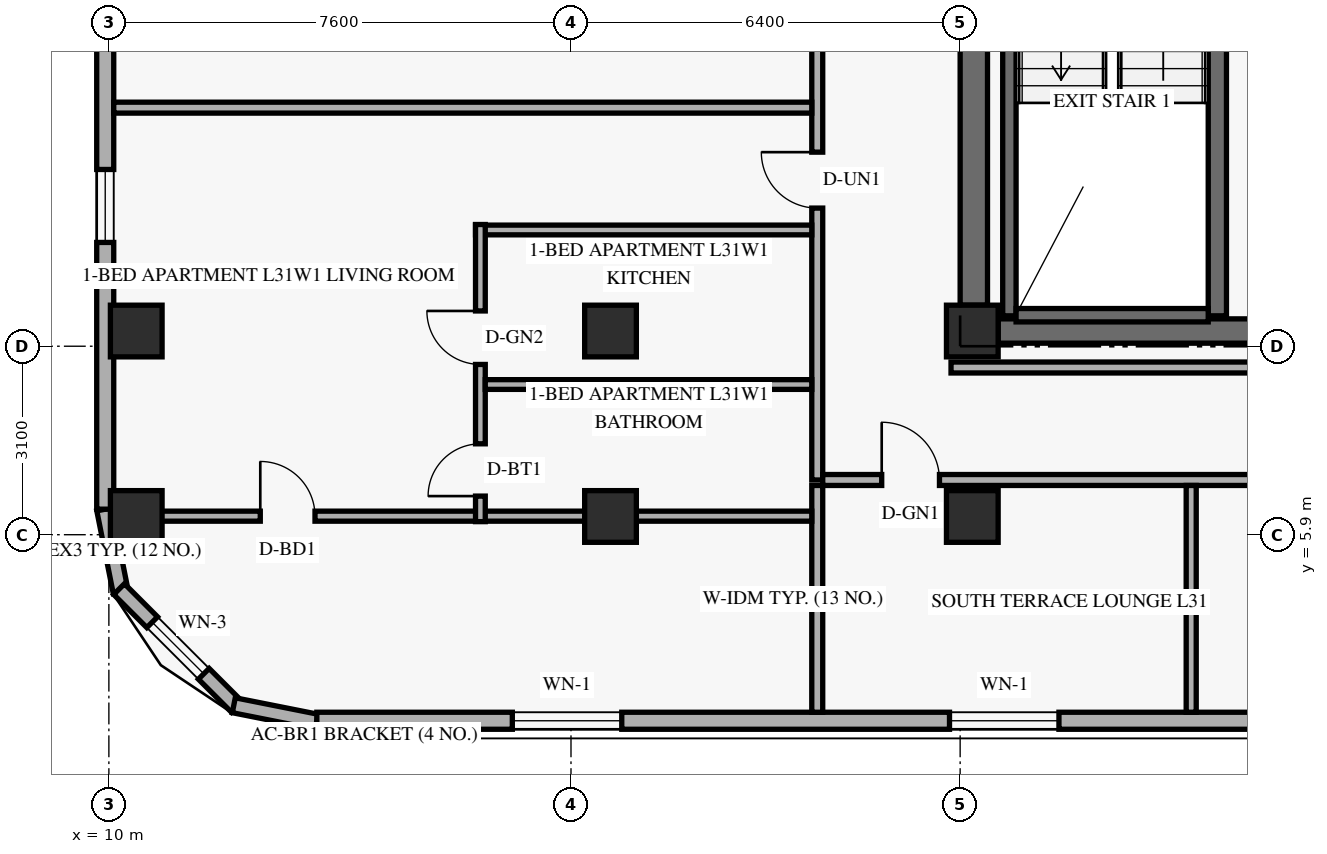
"""IFC4 building model, lengths in metres.
Left out: names, types, materials, properties, quantities, classifications, styles, units other than length and angle.
Written with IfcOpenShell. Run it as: python <this file> out.ifc"""

import sys

from ifc_helpers import new_model, si_unit, direction, frame, frame_2d, origin, origin_2d, place, context, subcontext, project, spatial, rectangle, extrude, element, fill, save


model = new_model("IFC4")
c1 = context("Model", 3, precision=1e-05, world=origin(), true_north=direction((0.0, 1.0)))
c2 = subcontext(c1, "Body", "Model", "MODEL_VIEW")
j1 = project(units=[si_unit("LENGTHUNIT", "METRE"), si_unit("PLANEANGLEUNIT", "RADIAN")], contexts=[c1])
p1 = place(None, origin())
s1 = spatial("IfcSite", under=j1, at=p1, CompositionType="ELEMENT")
p2 = place(p1, origin())
s2 = spatial("IfcBuilding", under=s1, at=p2, CompositionType="ELEMENT")
p3 = place(p2, frame((0.0, 0.0, 121.2)))
s3 = spatial("IfcBuildingStorey", under=s2, at=p3, CompositionType="ELEMENT", Elevation=121.2)
p4 = place(p3, frame((24.225, 9.675, 0.0), z_axis=(0.0, 0.0, 1.0), x_axis=(0.0, 1.0, 0.0)))
e1 = element("IfcWall", 1, at=p4, inside=s3, PredefinedType="SHEAR", context=c2, shape_type="SweptSolid", body=[
    extrude(rectangle(XDim=7.45, YDim=0.45, at=frame_2d((3.725, 0.0))), origin(), (0.0, 0.0, 1.0), 2.749),
])
p5 = place(p3, frame((24.625, 9.25, 0.0), z_axis=(0.0, 0.0, 1.0), x_axis=(1.0, 0.0, 0.0)))
e2 = element("IfcWall", 2, at=p5, inside=s3, PredefinedType="SHEAR", context=c2, shape_type="SweptSolid", body=[
    extrude(rectangle(XDim=10.15, YDim=0.4, at=frame_2d((5.075, 0.0))), origin(), (0.0, 0.0, 1.0), 3.36),
])
p6 = place(p5, frame((5.2, 0.0, 0.0)))
e3 = element("IfcOpeningElement", 3, at=p6, cuts=e2, PredefinedType="OPENING", context=c2, shape_type="SweptSolid", body=[
    extrude(rectangle(XDim=1.05, YDim=2.15, at=frame_2d((0.525, 1.075))), frame((0.0, 0.21, 0.0), z_axis=(0.0, -1.0, 0.0), x_axis=(1.0, 0.0, 0.0)), (0.0, 0.0, 1.0), 0.42),
])
p7 = place(p3, frame((24.81, 9.5, 0.0), z_axis=(0.0, 0.0, 1.0), x_axis=(0.0, 1.0, 0.0)))
e4 = element("IfcWall", 4, at=p7, inside=s3, PredefinedType="SHEAR", context=c2, shape_type="SweptSolid", body=[
    extrude(rectangle(XDim=7.76, YDim=0.22, at=frame_2d((3.88, 0.0))), origin(), (0.0, 0.0, 1.0), 3.36),
])
p8 = place(p3, frame((28.23, 9.5, 0.0), z_axis=(0.0, 0.0, 1.0), x_axis=(0.0, 1.0, 0.0)))
e5 = element("IfcWall", 5, at=p8, inside=s3, PredefinedType="SHEAR", context=c2, shape_type="SweptSolid", body=[
    extrude(rectangle(XDim=7.76, YDim=0.3, at=frame_2d((3.88, 0.0))), origin(), (0.0, 0.0, 1.0), 3.36),
])
p9 = place(p3, frame((24.92, 9.51, 0.0), z_axis=(0.0, 0.0, 1.0), x_axis=(1.0, 0.0, 0.0)))
e6 = element("IfcWall", 6, at=p9, inside=s3, PredefinedType="SHEAR", context=c2, shape_type="SweptSolid", body=[
    extrude(rectangle(XDim=3.16, YDim=0.22, at=frame_2d((1.58, 0.0))), origin(), (0.0, 0.0, 1.0), 3.36),
])
for number, where, z_axis, x_axis in (
    (7, (10.45, 6.2, 0.0), (0.0, 0.0, 1.0), (1.0, 0.0, 0.0)),
    (8, (10.45, 9.25, 0.0), (0.0, 0.0, 1.0), (1.0, 0.0, 0.0)),
    (9, (18.25, 6.2, 0.0), (0.0, 0.0, 1.0), (1.0, 0.0, 0.0)),
    (10, (18.25, 9.25, 0.0), (0.0, 0.0, 1.0), (1.0, 0.0, 0.0)),
    (11, (24.2, 6.2, 0.0), (0.0, 0.0, 1.0), (1.0, 0.0, 0.0)),
    (12, (24.2, 9.25, 0.0), (0.0, 0.0, 1.0), (1.0, 0.0, 0.0)),
):
    element("IfcColumn", number, at=place(p3, frame(where, z_axis=z_axis, x_axis=x_axis)), inside=s3, PredefinedType="COLUMN", context=c2, shape_type="SweptSolid", body=[
        extrude(rectangle(XDim=0.85, YDim=0.85, at=origin_2d()), origin(), (0.0, 0.0, 1.0), 3.6),
    ])
p10 = place(p3, frame((9.924, 6.316, 0.0), z_axis=(0.0, 0.0, 1.0), x_axis=(0.195000137217, -0.980803214965, 0.0)))
e13 = element("IfcWall", 13, at=p10, inside=s3, PredefinedType="SOLIDWALL", context=c2, shape_type="SweptSolid", body=[
    extrude(rectangle(XDim=1.388, YDim=0.25, at=frame_2d((0.694, 0.0))), origin(), (0.0, 0.0, 1.0), 3.36),
])
p11 = place(p3, frame((10.168, 5.005, 0.0), z_axis=(0.0, 0.0, 1.0), x_axis=(0.707151344399, -0.707062215165, 0.0)))
e14 = element("IfcWall", 14, at=p11, inside=s3, PredefinedType="SOLIDWALL", context=c2, shape_type="SweptSolid", body=[
    extrude(rectangle(XDim=2.739, YDim=0.25, at=frame_2d((1.37, 0.0))), origin(), (0.0, 0.0, 1.0), 3.36),
])
p12 = place(p11, frame((0.77, 0.0, 0.85)))
e15 = element("IfcOpeningElement", 15, at=p12, cuts=e14, PredefinedType="OPENING", context=c2, shape_type="SweptSolid", body=[
    extrude(rectangle(XDim=1.2, YDim=1.5, at=frame_2d((0.6, 0.75))), frame((0.0, 0.135, 0.0), z_axis=(0.0, -1.0, 0.0), x_axis=(1.0, 0.0, 0.0)), (0.0, 0.0, 1.0), 0.27),
])
p13 = place(p3, frame((12.054, 3.095, 0.0), z_axis=(0.0, 0.0, 1.0), x_axis=(0.980809899341, -0.19496651342, 0.0)))
e16 = element("IfcWall", 16, at=p13, inside=s3, PredefinedType="SOLIDWALL", context=c2, shape_type="SweptSolid", body=[
    extrude(rectangle(XDim=1.389, YDim=0.25, at=frame_2d((0.694, 0.0))), origin(), (0.0, 0.0, 1.0), 3.36),
])
p14 = place(p3, frame((13.42, 2.84, 0.0), z_axis=(0.0, 0.0, 1.0), x_axis=(1.0, 0.0, 0.0)))
e17 = element("IfcWall", 17, at=p14, inside=s3, PredefinedType="SOLIDWALL", context=c2, shape_type="SweptSolid", body=[
    extrude(rectangle(XDim=36.56, YDim=0.28, at=frame_2d((18.28, 0.0))), origin(), (0.0, 0.0, 1.0), 3.36),
])
p15 = place(p14, frame((3.215, 0.0, 0.85)))
e18 = element("IfcOpeningElement", 18, at=p15, cuts=e17, PredefinedType="OPENING", context=c2, shape_type="SweptSolid", body=[
    extrude(rectangle(XDim=1.8, YDim=1.6, at=frame_2d((0.9, 0.8))), frame((0.0, 0.15, 0.0), z_axis=(0.0, -1.0, 0.0), x_axis=(1.0, 0.0, 0.0)), (0.0, 0.0, 1.0), 0.3),
])
p16 = place(p14, frame((10.405, 0.0, 0.85)))
e19 = element("IfcOpeningElement", 19, at=p16, cuts=e17, PredefinedType="OPENING", context=c2, shape_type="SweptSolid", body=[
    extrude(rectangle(XDim=1.8, YDim=1.6, at=frame_2d((0.9, 0.8))), frame((0.0, 0.15, 0.0), z_axis=(0.0, -1.0, 0.0), x_axis=(1.0, 0.0, 0.0)), (0.0, 0.0, 1.0), 0.3),
])
p17 = place(p14, frame((17.29, 0.0, 0.85)))
e20 = element("IfcOpeningElement", 20, at=p17, cuts=e17, PredefinedType="OPENING", context=c2, shape_type="SweptSolid", body=[
    extrude(rectangle(XDim=1.8, YDim=1.6, at=frame_2d((0.9, 0.8))), frame((0.0, 0.15, 0.0), z_axis=(0.0, -1.0, 0.0), x_axis=(1.0, 0.0, 0.0)), (0.0, 0.0, 1.0), 0.3),
])
p18 = place(p14, frame((22.565, 0.0, 0.85)))
e21 = element("IfcOpeningElement", 21, at=p18, cuts=e17, PredefinedType="OPENING", context=c2, shape_type="SweptSolid", body=[
    extrude(rectangle(XDim=1.8, YDim=1.6, at=frame_2d((0.9, 0.8))), frame((0.0, 0.15, 0.0), z_axis=(0.0, -1.0, 0.0), x_axis=(1.0, 0.0, 0.0)), (0.0, 0.0, 1.0), 0.3),
])
p19 = place(p14, frame((28.355, 0.0, 0.85)))
e22 = element("IfcOpeningElement", 22, at=p19, cuts=e17, PredefinedType="OPENING", context=c2, shape_type="SweptSolid", body=[
    extrude(rectangle(XDim=1.8, YDim=1.6, at=frame_2d((0.9, 0.8))), frame((0.0, 0.15, 0.0), z_axis=(0.0, -1.0, 0.0), x_axis=(1.0, 0.0, 0.0)), (0.0, 0.0, 1.0), 0.3),
])
p20 = place(p14, frame((34.17, 0.0, 0.85)))
e23 = element("IfcOpeningElement", 23, at=p20, cuts=e17, PredefinedType="OPENING", context=c2, shape_type="SweptSolid", body=[
    extrude(rectangle(XDim=1.8, YDim=1.6, at=frame_2d((0.9, 0.8))), frame((0.0, 0.15, 0.0), z_axis=(0.0, -1.0, 0.0), x_axis=(1.0, 0.0, 0.0)), (0.0, 0.0, 1.0), 0.3),
])
p21 = place(p3, frame((9.94, 41.68, 0.0), z_axis=(0.0, 0.0, 1.0), x_axis=(0.0, -1.0, 0.0)))
e24 = element("IfcWall", 24, at=p21, inside=s3, PredefinedType="SOLIDWALL", context=c2, shape_type="SweptSolid", body=[
    extrude(rectangle(XDim=35.36, YDim=0.28, at=frame_2d((17.68, 0.0))), origin(), (0.0, 0.0, 1.0), 3.36),
])
p22 = place(p21, frame((29.773, 0.0, 0.85)))
e25 = element("IfcOpeningElement", 25, at=p22, cuts=e24, PredefinedType="OPENING", context=c2, shape_type="SweptSolid", body=[
    extrude(rectangle(XDim=1.2, YDim=1.5, at=frame_2d((0.6, 0.75))), frame((0.0, 0.15, 0.0), z_axis=(0.0, -1.0, 0.0), x_axis=(1.0, 0.0, 0.0)), (0.0, 0.0, 1.0), 0.3),
])
p23 = place(p21, frame((26.063, 0.0, 0.85)))
e26 = element("IfcOpeningElement", 26, at=p23, cuts=e24, PredefinedType="OPENING", context=c2, shape_type="SweptSolid", body=[
    extrude(rectangle(XDim=1.2, YDim=1.5, at=frame_2d((0.6, 0.75))), frame((0.0, 0.15, 0.0), z_axis=(0.0, -1.0, 0.0), x_axis=(1.0, 0.0, 0.0)), (0.0, 0.0, 1.0), 0.3),
])
p24 = place(p21, frame((19.032, 0.0, 0.85)))
e27 = element("IfcOpeningElement", 27, at=p24, cuts=e24, PredefinedType="OPENING", context=c2, shape_type="SweptSolid", body=[
    extrude(rectangle(XDim=1.2, YDim=1.5, at=frame_2d((0.6, 0.75))), frame((0.0, 0.15, 0.0), z_axis=(0.0, -1.0, 0.0), x_axis=(1.0, 0.0, 0.0)), (0.0, 0.0, 1.0), 0.3),
])
p25 = place(p21, frame((14.2, 0.0, 0.85)))
e28 = element("IfcOpeningElement", 28, at=p25, cuts=e24, PredefinedType="OPENING", context=c2, shape_type="SweptSolid", body=[
    extrude(rectangle(XDim=1.2, YDim=1.5, at=frame_2d((0.6, 0.75))), frame((0.0, 0.15, 0.0), z_axis=(0.0, -1.0, 0.0), x_axis=(1.0, 0.0, 0.0)), (0.0, 0.0, 1.0), 0.3),
])
p26 = place(p21, frame((7.956, 0.0, 0.85)))
e29 = element("IfcOpeningElement", 29, at=p26, cuts=e24, PredefinedType="OPENING", context=c2, shape_type="SweptSolid", body=[
    extrude(rectangle(XDim=1.2, YDim=1.5, at=frame_2d((0.6, 0.75))), frame((0.0, 0.15, 0.0), z_axis=(0.0, -1.0, 0.0), x_axis=(1.0, 0.0, 0.0)), (0.0, 0.0, 1.0), 0.3),
])
p27 = place(p21, frame((4.387, 0.0, 0.85)))
e30 = element("IfcOpeningElement", 30, at=p27, cuts=e24, PredefinedType="OPENING", context=c2, shape_type="SweptSolid", body=[
    extrude(rectangle(XDim=1.2, YDim=1.5, at=frame_2d((0.6, 0.75))), frame((0.0, 0.15, 0.0), z_axis=(0.0, -1.0, 0.0), x_axis=(1.0, 0.0, 0.0)), (0.0, 0.0, 1.0), 0.3),
])
p28 = place(p3, frame((21.65, 6.8, 0.0), z_axis=(0.0, 0.0, 1.0), x_axis=(0.0, 1.0, 0.0)))
e31 = element("IfcWall", 31, at=p28, inside=s3, PredefinedType="STANDARD", context=c2, shape_type="SweptSolid", body=[
    extrude(rectangle(XDim=34.4, YDim=0.18, at=frame_2d((17.2, 0.0))), origin(), (0.0, 0.0, 1.0), 2.731),
])
p29 = place(p28, frame((4.472, 0.0, 0.0)))
e32 = element("IfcOpeningElement", 32, at=p29, cuts=e31, PredefinedType="OPENING", context=c2, shape_type="SweptSolid", body=[
    extrude(rectangle(XDim=0.92, YDim=2.15, at=frame_2d((0.46, 1.075))), frame((0.0, 0.1, 0.0), z_axis=(0.0, -1.0, 0.0), x_axis=(1.0, 0.0, 0.0)), (0.0, 0.0, 1.0), 0.2),
])
p30 = place(p28, frame((7.261, 0.0, 0.0)))
e33 = element("IfcOpeningElement", 33, at=p30, cuts=e31, PredefinedType="OPENING", context=c2, shape_type="SweptSolid", body=[
    extrude(rectangle(XDim=0.92, YDim=2.15, at=frame_2d((0.46, 1.075))), frame((0.0, 0.1, 0.0), z_axis=(0.0, -1.0, 0.0), x_axis=(1.0, 0.0, 0.0)), (0.0, 0.0, 1.0), 0.2),
])
p31 = place(p28, frame((18.308, 0.0, 0.0)))
e34 = element("IfcOpeningElement", 34, at=p31, cuts=e31, PredefinedType="OPENING", context=c2, shape_type="SweptSolid", body=[
    extrude(rectangle(XDim=0.92, YDim=2.15, at=frame_2d((0.46, 1.075))), frame((0.0, 0.1, 0.0), z_axis=(0.0, -1.0, 0.0), x_axis=(1.0, 0.0, 0.0)), (0.0, 0.0, 1.0), 0.2),
])
p32 = place(p28, frame((29.045, 0.0, 0.0)))
e35 = element("IfcOpeningElement", 35, at=p32, cuts=e31, PredefinedType="OPENING", context=c2, shape_type="SweptSolid", body=[
    extrude(rectangle(XDim=0.92, YDim=2.15, at=frame_2d((0.46, 1.075))), frame((0.0, 0.1, 0.0), z_axis=(0.0, -1.0, 0.0), x_axis=(1.0, 0.0, 0.0)), (0.0, 0.0, 1.0), 0.2),
])
p33 = place(p3, frame((21.74, 6.8, 0.0), z_axis=(0.0, 0.0, 1.0), x_axis=(1.0, 0.0, 0.0)))
e36 = element("IfcWall", 36, at=p33, inside=s3, PredefinedType="STANDARD", context=c2, shape_type="SweptSolid", body=[
    extrude(rectangle(XDim=13.68, YDim=0.18, at=frame_2d((6.84, 0.0))), origin(), (0.0, 0.0, 1.0), 2.731),
])
p34 = place(p33, frame((0.97, 0.0, 0.0)))
e37 = element("IfcOpeningElement", 37, at=p34, cuts=e36, PredefinedType="OPENING", context=c2, shape_type="SweptSolid", body=[
    extrude(rectangle(XDim=0.95, YDim=2.15, at=frame_2d((0.475, 1.075))), frame((0.0, 0.1, 0.0), z_axis=(0.0, -1.0, 0.0), x_axis=(1.0, 0.0, 0.0)), (0.0, 0.0, 1.0), 0.2),
])
p35 = place(p33, frame((9.11, 0.0, 0.0)))
e38 = element("IfcOpeningElement", 38, at=p35, cuts=e36, PredefinedType="OPENING", context=c2, shape_type="SweptSolid", body=[
    extrude(rectangle(XDim=0.95, YDim=2.15, at=frame_2d((0.475, 1.075))), frame((0.0, 0.1, 0.0), z_axis=(0.0, -1.0, 0.0), x_axis=(1.0, 0.0, 0.0)), (0.0, 0.0, 1.0), 0.2),
])
p36 = place(p3, frame((23.85, 8.65, 0.0), z_axis=(0.0, 0.0, 1.0), x_axis=(1.0, 0.0, 0.0)))
e39 = element("IfcWall", 39, at=p36, inside=s3, PredefinedType="STANDARD", context=c2, shape_type="SweptSolid", body=[
    extrude(rectangle(XDim=11.57, YDim=0.18, at=frame_2d((5.785, 0.0))), origin(), (0.0, 0.0, 1.0), 2.731),
])
p37 = place(p3, frame((21.65, 2.98, 0.0), z_axis=(0.0, 0.0, 1.0), x_axis=(0.0, 1.0, 0.0)))
e40 = element("IfcWall", 40, at=p37, inside=s3, PredefinedType="PARTITIONING", context=c2, shape_type="SweptSolid", body=[
    extrude(rectangle(XDim=3.73, YDim=0.18, at=frame_2d((1.865, 0.0))), origin(), (0.0, 0.0, 1.0), 2.809),
])
p38 = place(p3, frame((10.099, 6.205, 0.0), z_axis=(0.0, 0.0, 1.0), x_axis=(1.0, 0.0, 0.0)))
e41 = element("IfcWall", 41, at=p38, inside=s3, PredefinedType="PARTITIONING", context=c2, shape_type="SweptSolid", body=[
    extrude(rectangle(XDim=11.461, YDim=0.165, at=frame_2d((5.73, 0.0))), origin(), (0.0, 0.0, 1.0), 2.809),
])
p39 = place(p38, frame((2.391, 0.0, 0.0)))
e42 = element("IfcOpeningElement", 42, at=p39, cuts=e41, PredefinedType="OPENING", context=c2, shape_type="SweptSolid", body=[
    extrude(rectangle(XDim=0.9, YDim=2.14, at=frame_2d((0.45, 1.07))), frame((0.0, 0.093, 0.0), z_axis=(0.0, -1.0, 0.0), x_axis=(1.0, 0.0, 0.0)), (0.0, 0.0, 1.0), 0.185),
])
p40 = place(p3, frame((16.03, 10.912, 0.0), z_axis=(0.0, 0.0, 1.0), x_axis=(1.0, 0.0, 0.0)))
e43 = element("IfcWall", 43, at=p40, inside=s3, PredefinedType="PLUMBINGWALL", context=c2, shape_type="SweptSolid", body=[
    extrude(rectangle(XDim=5.53, YDim=0.16, at=frame_2d((2.765, 0.0))), origin(), (0.0, 0.0, 1.0), 2.731),
])
p41 = place(p3, frame((16.11, 6.115, 0.0), z_axis=(0.0, 0.0, 1.0), x_axis=(0.0, 1.0, 0.0)))
e44 = element("IfcWall", 44, at=p41, inside=s3, PredefinedType="PLUMBINGWALL", context=c2, shape_type="SweptSolid", body=[
    extrude(rectangle(XDim=4.887, YDim=0.16, at=frame_2d((2.443, 0.0))), origin(), (0.0, 0.0, 1.0), 2.731),
])
p42 = place(p41, frame((0.42, 0.0, 0.0)))
e45 = element("IfcOpeningElement", 45, at=p42, cuts=e44, PredefinedType="OPENING", context=c2, shape_type="SweptSolid", body=[
    extrude(rectangle(XDim=0.86, YDim=2.12, at=frame_2d((0.43, 1.06))), frame((0.0, 0.09, 0.0), z_axis=(0.0, -1.0, 0.0), x_axis=(1.0, 0.0, 0.0)), (0.0, 0.0, 1.0), 0.18),
])
p43 = place(p41, frame((2.585, 0.0, 0.0)))
e46 = element("IfcOpeningElement", 46, at=p43, cuts=e44, PredefinedType="OPENING", context=c2, shape_type="SweptSolid", body=[
    extrude(rectangle(XDim=0.88, YDim=2.12, at=frame_2d((0.44, 1.06))), frame((0.0, 0.09, 0.0), z_axis=(0.0, -1.0, 0.0), x_axis=(1.0, 0.0, 0.0)), (0.0, 0.0, 1.0), 0.18),
])
p44 = place(p3, frame((16.19, 8.37, 0.0), z_axis=(0.0, 0.0, 1.0), x_axis=(1.0, 0.0, 0.0)))
e47 = element("IfcWall", 47, at=p44, inside=s3, PredefinedType="PLUMBINGWALL", context=c2, shape_type="SweptSolid", body=[
    extrude(rectangle(XDim=5.37, YDim=0.16, at=frame_2d((2.685, 0.0))), origin(), (0.0, 0.0, 1.0), 2.731),
])
p45 = place(p3, frame((10.08, 12.924, 0.0), z_axis=(0.0, 0.0, 1.0), x_axis=(1.0, 0.0, 0.0)))
e48 = element("IfcWall", 48, at=p45, inside=s3, PredefinedType="PARTITIONING", context=c2, shape_type="SweptSolid", body=[
    extrude(rectangle(XDim=11.48, YDim=0.18, at=frame_2d((5.74, 0.0))), origin(), (0.0, 0.0, 1.0), 2.731),
])
p46 = place(p3, frame((27.8, 2.98, 0.0), z_axis=(0.0, 0.0, 1.0), x_axis=(0.0, 1.0, 0.0)))
e49 = element("IfcWall", 49, at=p46, inside=s3, PredefinedType="PARTITIONING", context=c2, shape_type="SweptSolid", body=[
    extrude(rectangle(XDim=3.73, YDim=0.165, at=frame_2d((1.865, 0.0))), origin(), (0.0, 0.0, 1.0), 2.809),
])
p47 = place(p12, origin())
e50 = element("IfcWindow", 50, at=p47, inside=s3, PartitioningType="SINGLE_PANEL", PredefinedType="WINDOW", context=c2, shape_type="SweptSolid", body=[
    extrude(rectangle(XDim=1.2, YDim=1.5, at=frame_2d((0.6, 0.75))), frame((0.0, 0.03, 0.0), z_axis=(0.0, -1.0, 0.0), x_axis=(1.0, 0.0, 0.0)), (0.0, 0.0, 1.0), 0.06),
])
fill(e15, e50)
p48 = place(p15, origin())
e51 = element("IfcWindow", 51, at=p48, inside=s3, PartitioningType="SINGLE_PANEL", PredefinedType="WINDOW", context=c2, shape_type="SweptSolid", body=[
    extrude(rectangle(XDim=1.8, YDim=1.6, at=frame_2d((0.9, 0.8))), frame((0.0, 0.03, 0.0), z_axis=(0.0, -1.0, 0.0), x_axis=(1.0, 0.0, 0.0)), (0.0, 0.0, 1.0), 0.06),
])
fill(e18, e51)
p49 = place(p16, origin())
e52 = element("IfcWindow", 52, at=p49, inside=s3, PartitioningType="SINGLE_PANEL", PredefinedType="WINDOW", context=c2, shape_type="SweptSolid", body=[
    extrude(rectangle(XDim=1.8, YDim=1.6, at=frame_2d((0.9, 0.8))), frame((0.0, 0.03, 0.0), z_axis=(0.0, -1.0, 0.0), x_axis=(1.0, 0.0, 0.0)), (0.0, 0.0, 1.0), 0.06),
])
fill(e19, e52)
p50 = place(p22, origin())
e53 = element("IfcWindow", 53, at=p50, inside=s3, PartitioningType="SINGLE_PANEL", PredefinedType="WINDOW", context=c2, shape_type="SweptSolid", body=[
    extrude(rectangle(XDim=1.2, YDim=1.5, at=frame_2d((0.6, 0.75))), frame((0.0, 0.03, 0.0), z_axis=(0.0, -1.0, 0.0), x_axis=(1.0, 0.0, 0.0)), (0.0, 0.0, 1.0), 0.06),
])
fill(e25, e53)
p51 = place(p29, origin())
e54 = element("IfcDoor", 54, at=p51, inside=s3, OperationType="SINGLE_SWING_RIGHT", PredefinedType="DOOR", context=c2, shape_type="SweptSolid", body=[
    extrude(rectangle(XDim=0.92, YDim=2.15, at=frame_2d((0.46, 1.075))), frame((0.0, 0.025, 0.0), z_axis=(0.0, -1.0, 0.0), x_axis=(1.0, 0.0, 0.0)), (0.0, 0.0, 1.0), 0.05),
])
fill(e32, e54)
p52 = place(p42, origin())
e55 = element("IfcDoor", 55, at=p52, inside=s3, OperationType="SINGLE_SWING_LEFT", PredefinedType="DOOR", context=c2, shape_type="SweptSolid", body=[
    extrude(rectangle(XDim=0.86, YDim=2.12, at=frame_2d((0.43, 1.06))), frame((0.0, 0.025, 0.0), z_axis=(0.0, -1.0, 0.0), x_axis=(1.0, 0.0, 0.0)), (0.0, 0.0, 1.0), 0.05),
])
fill(e45, e55)
p53 = place(p43, origin())
e56 = element("IfcDoor", 56, at=p53, inside=s3, OperationType="SINGLE_SWING_RIGHT", PredefinedType="DOOR", context=c2, shape_type="SweptSolid", body=[
    extrude(rectangle(XDim=0.88, YDim=2.12, at=frame_2d((0.44, 1.06))), frame((0.0, 0.025, 0.0), z_axis=(0.0, -1.0, 0.0), x_axis=(1.0, 0.0, 0.0)), (0.0, 0.0, 1.0), 0.05),
])
fill(e46, e56)
p54 = place(p39, origin())
e57 = element("IfcDoor", 57, at=p54, inside=s3, OperationType="SINGLE_SWING_LEFT", PredefinedType="DOOR", context=c2, shape_type="SweptSolid", body=[
    extrude(rectangle(XDim=0.9, YDim=2.14, at=frame_2d((0.45, 1.07))), frame((0.0, 0.025, 0.0), z_axis=(0.0, -1.0, 0.0), x_axis=(1.0, 0.0, 0.0)), (0.0, 0.0, 1.0), 0.05),
])
fill(e42, e57)
p55 = place(p34, origin())
e58 = element("IfcDoor", 58, at=p55, inside=s3, OperationType="SINGLE_SWING_LEFT", PredefinedType="DOOR", context=c2, shape_type="SweptSolid", body=[
    extrude(rectangle(XDim=0.95, YDim=2.15, at=frame_2d((0.475, 1.075))), frame((0.0, 0.025, 0.0), z_axis=(0.0, -1.0, 0.0), x_axis=(1.0, 0.0, 0.0)), (0.0, 0.0, 1.0), 0.05),
])
fill(e37, e58)
save(model, sys.argv[1])
